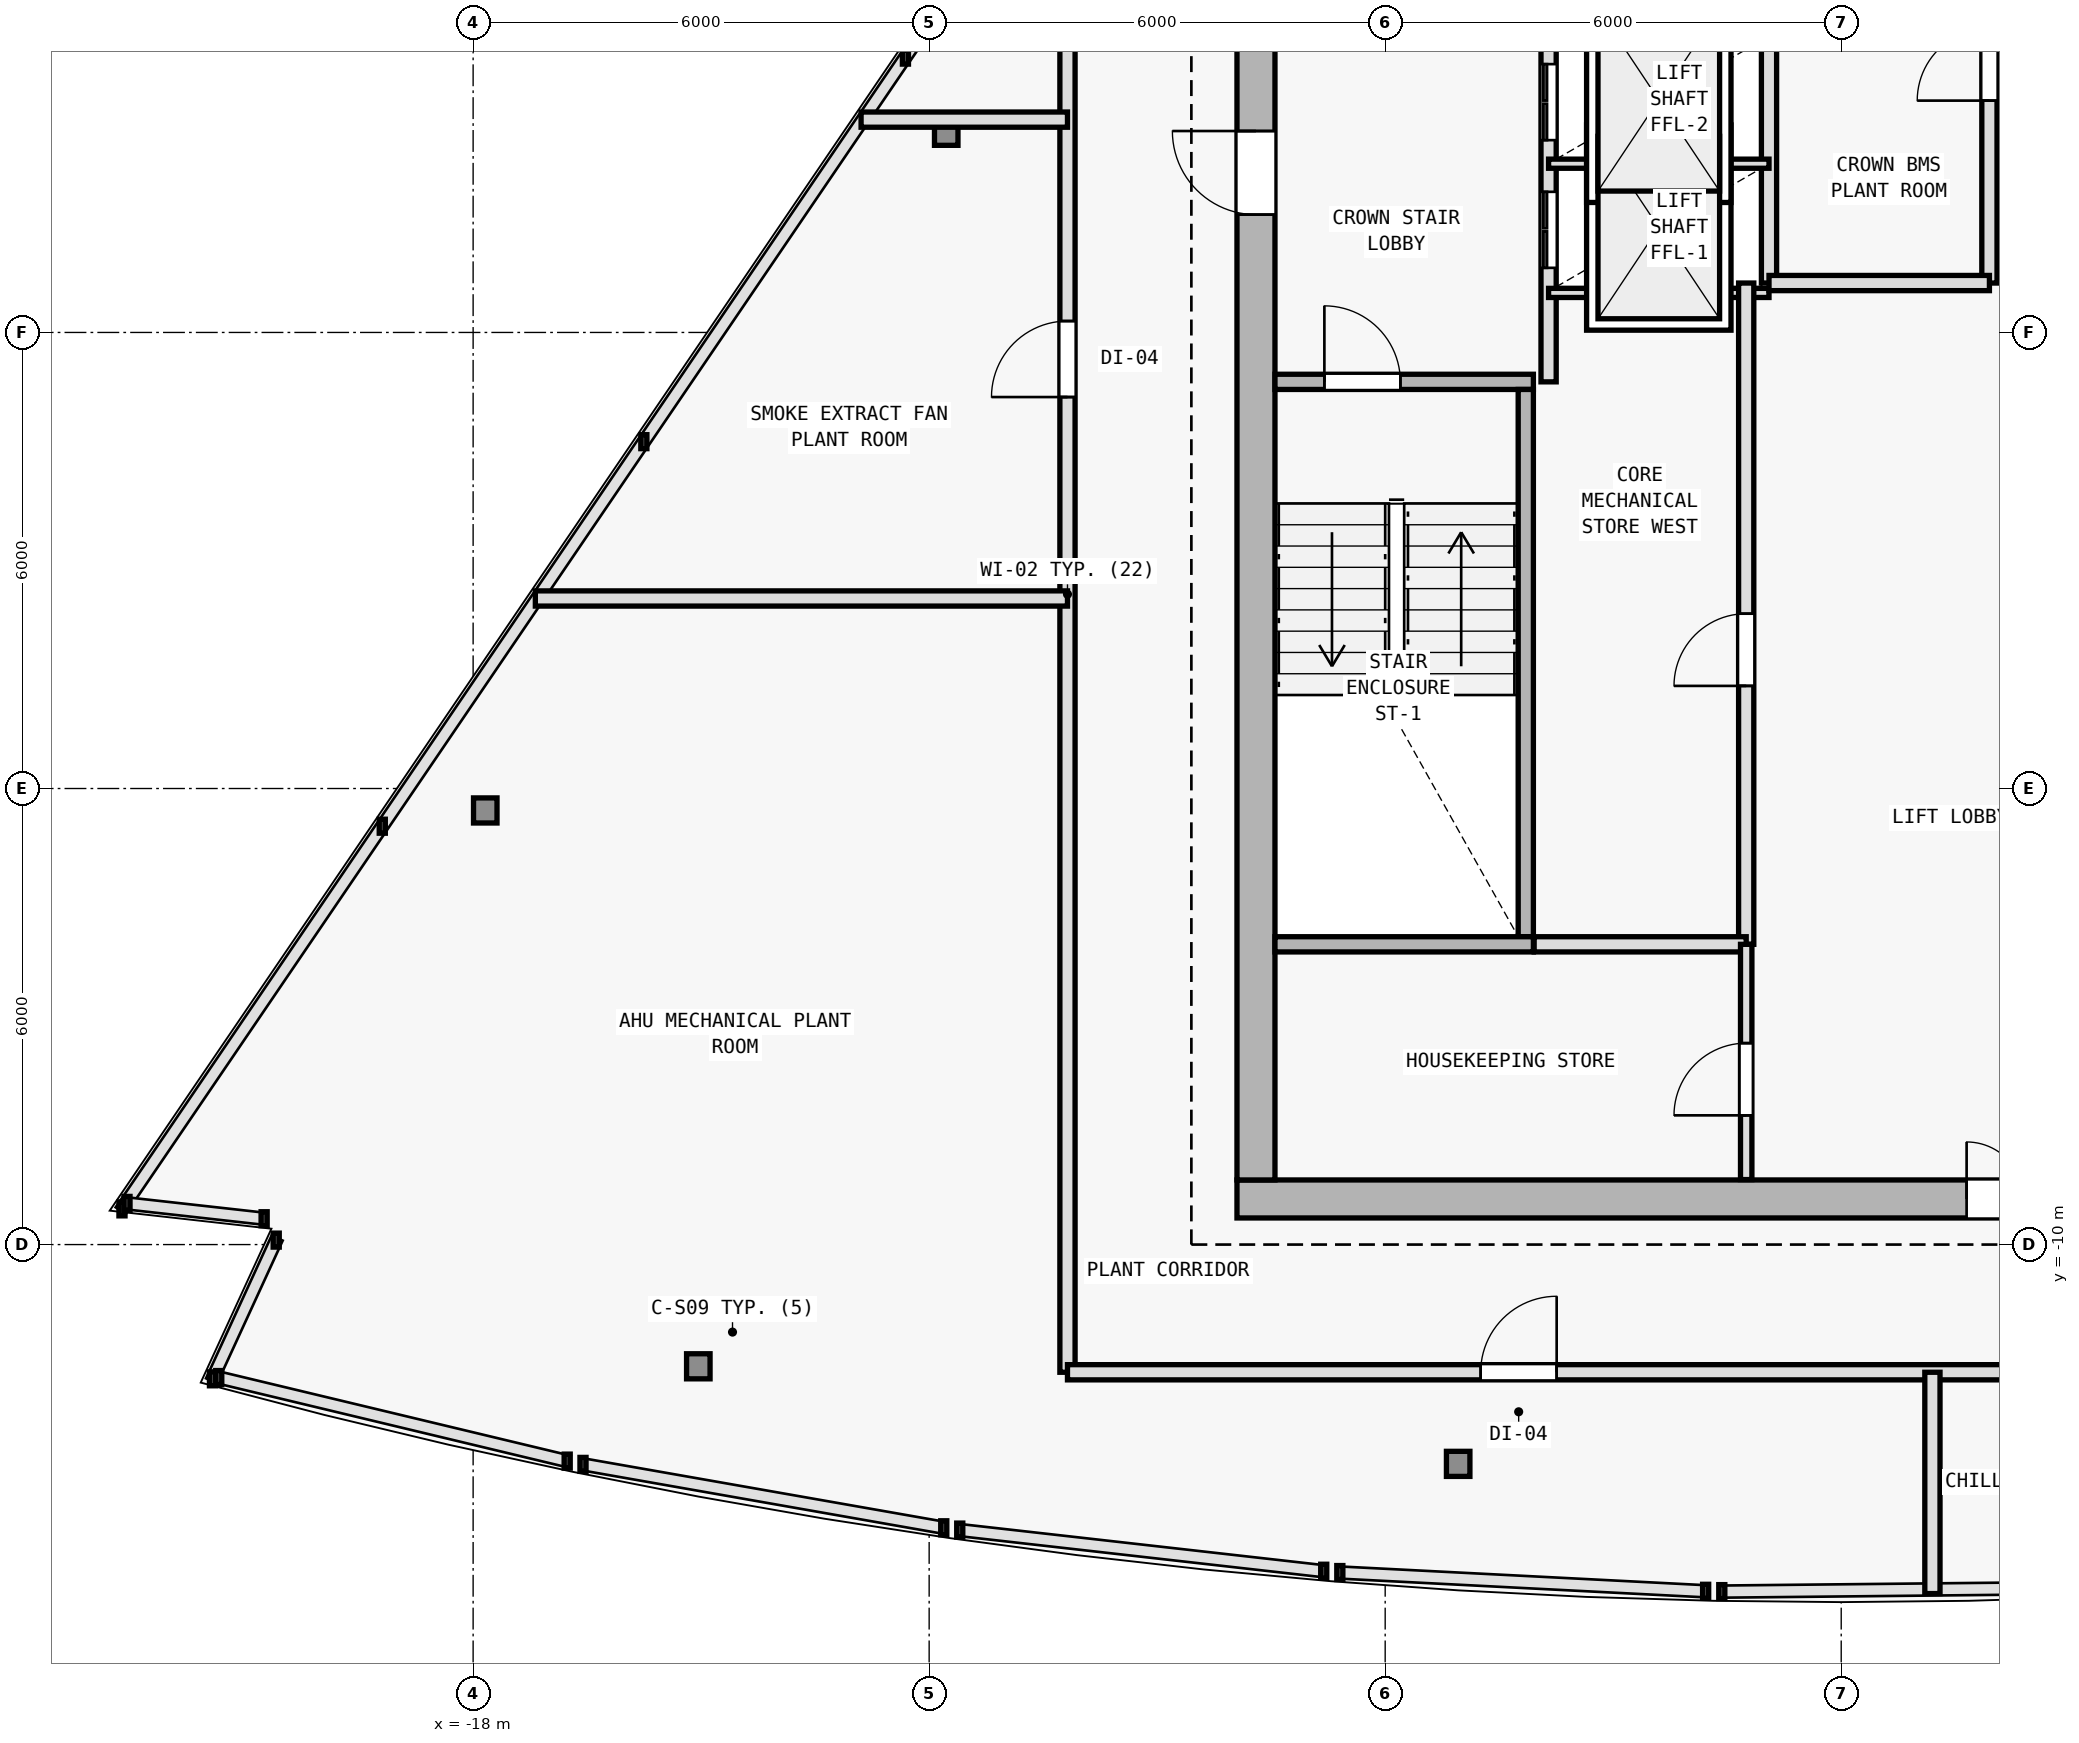
"""IFC4 building model, lengths in metres.
Left out: names, types, materials, properties, quantities, classifications, styles, units other than length and angle.
Written with IfcOpenShell. Run it as: python <this file> out.ifc"""

import sys

from ifc_helpers import new_model, si_unit, direction, frame, frame_2d, origin, origin_2d, place, context, subcontext, project, spatial, rectangle, i_section, extrude, element, fill, save


model = new_model("IFC4")
c1 = context("Model", 3, precision=1e-05, world=origin(), true_north=direction((0.0, 1.0)))
c2 = subcontext(c1, "Body", "Model", "MODEL_VIEW")
j1 = project(units=[si_unit("LENGTHUNIT", "METRE"), si_unit("PLANEANGLEUNIT", "RADIAN")], contexts=[c1])
p1 = place(None, origin())
s1 = spatial("IfcSite", under=j1, at=p1, CompositionType="ELEMENT")
p2 = place(p1, origin())
s2 = spatial("IfcBuilding", under=s1, at=p2, CompositionType="ELEMENT")
p3 = place(p2, frame((0.0, 0.0, 315.6)))
s3 = spatial("IfcBuildingStorey", under=s2, at=p3, CompositionType="ELEMENT", Elevation=315.6)
for number, where, z_axis, x_axis in (
    (1, (-7.7, -9.4, 0.0), (0.0, 0.0, 1.0), (1.0, 0.0, 0.0)),
    (2, (0.0, -9.4, 0.0), (0.0, 0.0, 1.0), (1.0, 0.0, 0.0)),
    (3, (-7.7, 2.0, 0.0), (0.0, 0.0, 1.0), (1.0, 0.0, 0.0)),
):
    element("IfcColumn", number, at=place(p3, frame(where, z_axis=z_axis, x_axis=x_axis)), inside=s3, PredefinedType="COLUMN", context=c2, shape_type="SweptSolid", body=[
        extrude(i_section(OverallWidth=0.374, OverallDepth=0.372, WebThickness=0.012, FlangeThickness=0.02, FilletRadius=0.015, at=origin_2d()), origin(), (0.0, 0.0, 1.0), 3.6),
    ])
for number, where, z_axis, x_axis in (
    (4, (-15.037, -11.602, 0.0), (0.0, 0.0, 1.0), (1.0, 0.0, 0.0)),
    (5, (-5.04, -12.885, 0.0), (0.0, 0.0, 1.0), (1.0, 0.0, 0.0)),
    (6, (-17.84, -4.289, 0.0), (0.0, 0.0, 1.0), (1.0, 0.0, 0.0)),
    (7, (-11.775, 4.627, 0.0), (0.0, 0.0, 1.0), (1.0, 0.0, 0.0)),
):
    element("IfcColumn", number, at=place(p3, frame(where, z_axis=z_axis, x_axis=x_axis)), inside=s3, PredefinedType="COLUMN", context=c2, shape_type="SweptSolid", body=[
        extrude(i_section(OverallWidth=0.309, OverallDepth=0.33, WebThickness=0.011, FlangeThickness=0.019, FilletRadius=0.027, at=origin_2d()), origin(), (0.0, 0.0, 1.0), 3.6),
    ])
p4 = place(p3, frame((-7.95, -9.4, 0.0), z_axis=(0.0, 0.0, 1.0), x_axis=(1.0, 0.0, 0.0)))
e8 = element("IfcWall", 8, at=p4, inside=s3, PredefinedType="SHEAR", context=c2, shape_type="SweptSolid", body=[
    extrude(rectangle(XDim=15.9, YDim=0.5, at=frame_2d((7.95, 0.0))), origin(), (0.0, 0.0, 1.0), 3.34),
])
p5 = place(p4, frame((9.6, 0.0, 0.0)))
e9 = element("IfcOpeningElement", 9, at=p5, cuts=e8, PredefinedType="OPENING", context=c2, shape_type="SweptSolid", body=[
    extrude(rectangle(XDim=1.5, YDim=2.2, at=frame_2d((0.75, 1.1))), frame((0.0, 0.26, 0.0), z_axis=(0.0, -1.0, 0.0), x_axis=(1.0, 0.0, 0.0)), (0.0, 0.0, 1.0), 0.52),
])
p6 = place(p3, frame((-7.7, -9.15, 0.0), z_axis=(0.0, 0.0, 1.0), x_axis=(0.0, 1.0, 0.0)))
e10 = element("IfcWall", 10, at=p6, inside=s3, PredefinedType="SHEAR", context=c2, shape_type="SweptSolid", body=[
    extrude(rectangle(XDim=19.1, YDim=0.5, at=frame_2d((9.55, 0.0))), origin(), (0.0, 0.0, 1.0), 3.34),
])
p7 = place(p6, frame((12.7, 0.0, 0.0)))
e11 = element("IfcOpeningElement", 11, at=p7, cuts=e10, PredefinedType="OPENING", context=c2, shape_type="SweptSolid", body=[
    extrude(rectangle(XDim=1.1, YDim=2.15, at=frame_2d((0.55, 1.075))), frame((0.0, 0.26, 0.0), z_axis=(0.0, -1.0, 0.0), x_axis=(1.0, 0.0, 0.0)), (0.0, 0.0, 1.0), 0.52),
])
p8 = place(p3, frame((-7.45, 1.35, 0.0), z_axis=(0.0, 0.0, 1.0), x_axis=(1.0, 0.0, 0.0)))
e12 = element("IfcWall", 12, at=p8, inside=s3, PredefinedType="SOLIDWALL", context=c2, shape_type="SweptSolid", body=[
    extrude(rectangle(XDim=3.4, YDim=0.2, at=frame_2d((1.7, 0.0))), origin(), (0.0, 0.0, 1.0), 3.34),
])
p9 = place(p8, frame((0.65, 0.0, 0.0)))
e13 = element("IfcOpeningElement", 13, at=p9, cuts=e12, PredefinedType="OPENING", context=c2, shape_type="SweptSolid", body=[
    extrude(rectangle(XDim=1.0, YDim=2.15, at=frame_2d((0.5, 1.075))), frame((0.0, 0.11, 0.0), z_axis=(0.0, -1.0, 0.0), x_axis=(1.0, 0.0, 0.0)), (0.0, 0.0, 1.0), 0.22),
])
p10 = place(p3, frame((-4.15, -5.95, 0.0), z_axis=(0.0, 0.0, 1.0), x_axis=(0.0, 1.0, 0.0)))
e14 = element("IfcWall", 14, at=p10, inside=s3, PredefinedType="SOLIDWALL", context=c2, shape_type="SweptSolid", body=[
    extrude(rectangle(XDim=7.2, YDim=0.2, at=frame_2d((3.6, 0.0))), origin(), (0.0, 0.0, 1.0), 3.34),
])
p11 = place(p3, frame((-3.85, 1.35, 0.0), z_axis=(0.0, 0.0, 1.0), x_axis=(0.0, 1.0, 0.0)))
e15 = element("IfcWall", 15, at=p11, inside=s3, PredefinedType="SOLIDWALL", context=c2, shape_type="SweptSolid", body=[
    extrude(rectangle(XDim=8.595, YDim=0.2, at=frame_2d((4.297, 0.0))), origin(), (0.0, 0.0, 1.0), 3.34),
])
p12 = place(p11, frame((1.5, 0.0, 0.0)))
e16 = element("IfcOpeningElement", 16, at=p12, cuts=e15, PredefinedType="OPENING", context=c2, shape_type="SweptSolid", body=[
    extrude(rectangle(XDim=1.0, YDim=2.15, at=frame_2d((0.5, 1.075))), frame((0.0, 0.11, 0.0), z_axis=(0.0, -1.0, 0.0), x_axis=(1.0, 0.0, 0.0)), (0.0, 0.0, 1.0), 0.22),
])
p13 = place(p11, frame((3.18, 0.0, 0.0)))
e17 = element("IfcOpeningElement", 17, at=p13, cuts=e15, PredefinedType="OPENING", context=c2, shape_type="SweptSolid", body=[
    extrude(rectangle(XDim=1.0, YDim=2.15, at=frame_2d((0.5, 1.075))), frame((0.0, 0.11, 0.0), z_axis=(0.0, -1.0, 0.0), x_axis=(1.0, 0.0, 0.0)), (0.0, 0.0, 1.0), 0.22),
])
p14 = place(p3, frame((-0.95, 2.65, 0.0), z_axis=(0.0, 0.0, 1.0), x_axis=(0.0, 1.0, 0.0)))
e18 = element("IfcWall", 18, at=p14, inside=s3, PredefinedType="SOLIDWALL", context=c2, shape_type="SweptSolid", body=[
    extrude(rectangle(XDim=3.27, YDim=0.2, at=frame_2d((1.635, 0.0))), origin(), (0.0, 0.0, 1.0), 3.34),
])
for number, where, z_axis, x_axis in (
    (19, (-3.85, 2.52, 0.0), (0.0, 0.0, 1.0), (1.0, 0.0, 0.0)),
    (20, (-3.85, 4.22, 0.0), (0.0, 0.0, 1.0), (1.0, 0.0, 0.0)),
):
    element("IfcWall", number, at=place(p3, frame(where, z_axis=z_axis, x_axis=x_axis)), inside=s3, PredefinedType="PARTITIONING", context=c2, shape_type="SweptSolid", body=[
        extrude(rectangle(XDim=2.9, YDim=0.12, at=frame_2d((1.45, 0.0))), origin(), (0.0, 0.0, 1.0), 3.34),
    ])
p15 = place(p3, frame((-1.25, -6.05, 0.0), z_axis=(0.0, 0.0, 1.0), x_axis=(0.0, 1.0, 0.0)))
e21 = element("IfcWall", 21, at=p15, inside=s3, PredefinedType="SOLIDWALL", context=c2, shape_type="SweptSolid", body=[
    extrude(rectangle(XDim=8.7, YDim=0.2, at=frame_2d((4.35, 0.0))), origin(), (0.0, 0.0, 1.0), 3.34),
])
p16 = place(p15, frame((3.4, 0.0, 0.0)))
e22 = element("IfcOpeningElement", 22, at=p16, cuts=e21, PredefinedType="OPENING", context=c2, shape_type="SweptSolid", body=[
    extrude(rectangle(XDim=0.95, YDim=2.1, at=frame_2d((0.475, 1.05))), frame((0.0, 0.11, 0.0), z_axis=(0.0, -1.0, 0.0), x_axis=(1.0, 0.0, 0.0)), (0.0, 0.0, 1.0), 0.22),
])
p17 = place(p3, frame((1.95, 2.65, 0.0), z_axis=(0.0, 0.0, 1.0), x_axis=(0.0, 1.0, 0.0)))
e23 = element("IfcWall", 23, at=p17, inside=s3, PredefinedType="SOLIDWALL", context=c2, shape_type="SweptSolid", body=[
    extrude(rectangle(XDim=7.295, YDim=0.2, at=frame_2d((3.647, 0.0))), origin(), (0.0, 0.0, 1.0), 3.34),
])
p18 = place(p17, frame((2.4, 0.0, 0.0)))
e24 = element("IfcOpeningElement", 24, at=p18, cuts=e23, PredefinedType="OPENING", context=c2, shape_type="SweptSolid", body=[
    extrude(rectangle(XDim=0.95, YDim=2.1, at=frame_2d((0.475, 1.05))), frame((0.0, 0.11, 0.0), z_axis=(0.0, -1.0, 0.0), x_axis=(1.0, 0.0, 0.0)), (0.0, 0.0, 1.0), 0.22),
])
p19 = place(p3, frame((-0.95, 2.65, 0.0), z_axis=(0.0, 0.0, 1.0), x_axis=(1.0, 0.0, 0.0)))
e25 = element("IfcWall", 25, at=p19, inside=s3, PredefinedType="SOLIDWALL", context=c2, shape_type="SweptSolid", body=[
    extrude(rectangle(XDim=2.9, YDim=0.2, at=frame_2d((1.45, 0.0))), origin(), (0.0, 0.0, 1.0), 3.34),
])
p20 = place(p3, frame((-7.45, -6.05, 0.0), z_axis=(0.0, 0.0, 1.0), x_axis=(1.0, 0.0, 0.0)))
e26 = element("IfcWall", 26, at=p20, inside=s3, PredefinedType="SOLIDWALL", context=c2, shape_type="SweptSolid", body=[
    extrude(rectangle(XDim=3.4, YDim=0.2, at=frame_2d((1.7, 0.0))), origin(), (0.0, 0.0, 1.0), 3.34),
])
p21 = place(p3, frame((-4.04, -6.05, 0.0), z_axis=(0.0, 0.0, 1.0), x_axis=(1.0, 0.0, 0.0)))
e27 = element("IfcWall", 27, at=p21, inside=s3, PredefinedType="SOLIDWALL", context=c2, shape_type="SweptSolid", body=[
    extrude(rectangle(XDim=2.79, YDim=0.2, at=frame_2d((1.395, 0.0))), origin(), (0.0, 0.0, 1.0), 3.34),
])
p22 = place(p3, frame((-1.25, -9.145, 0.0), z_axis=(0.0, 0.0, 1.0), x_axis=(0.0, 1.0, 0.0)))
e28 = element("IfcWall", 28, at=p22, inside=s3, PredefinedType="PARTITIONING", context=c2, shape_type="SweptSolid", body=[
    extrude(rectangle(XDim=3.095, YDim=0.15, at=frame_2d((1.547, 0.0))), origin(), (0.0, 0.0, 1.0), 3.34),
])
p23 = place(p22, frame((0.845, 0.0, 0.0)))
e29 = element("IfcOpeningElement", 29, at=p23, cuts=e28, PredefinedType="OPENING", context=c2, shape_type="SweptSolid", body=[
    extrude(rectangle(XDim=0.95, YDim=2.1, at=frame_2d((0.475, 1.05))), frame((0.0, 0.085, 0.0), z_axis=(0.0, -1.0, 0.0), x_axis=(1.0, 0.0, 0.0)), (0.0, 0.0, 1.0), 0.17),
])
p24 = place(p3, frame((-10.18, -11.68, 0.0), z_axis=(0.0, 0.0, 1.0), x_axis=(0.0, 1.0, 0.0)))
e30 = element("IfcWall", 30, at=p24, inside=s3, PredefinedType="SOLIDWALL", context=c2, shape_type="SweptSolid", body=[
    extrude(rectangle(XDim=20.472, YDim=0.2, at=frame_2d((10.236, 0.0))), origin(), (0.0, 0.0, 1.0), 2.995),
])
p25 = place(p24, frame((12.83, 0.0, 0.0)))
e31 = element("IfcOpeningElement", 31, at=p25, cuts=e30, PredefinedType="OPENING", context=c2, shape_type="SweptSolid", body=[
    extrude(rectangle(XDim=1.0, YDim=2.15, at=frame_2d((0.5, 1.075))), frame((0.0, 0.11, 0.0), z_axis=(0.0, -1.0, 0.0), x_axis=(1.0, 0.0, 0.0)), (0.0, 0.0, 1.0), 0.22),
])
p26 = place(p3, frame((-10.18, -11.68, 0.0), z_axis=(0.0, 0.0, 1.0), x_axis=(1.0, 0.0, 0.0)))
e32 = element("IfcWall", 32, at=p26, inside=s3, PredefinedType="SOLIDWALL", context=c2, shape_type="SweptSolid", body=[
    extrude(rectangle(XDim=18.13, YDim=0.2, at=frame_2d((9.065, 0.0))), origin(), (0.0, 0.0, 1.0), 2.995),
])
p27 = place(p26, frame((5.436, 0.0, 0.0)))
e33 = element("IfcOpeningElement", 33, at=p27, cuts=e32, PredefinedType="OPENING", context=c2, shape_type="SweptSolid", body=[
    extrude(rectangle(XDim=1.0, YDim=2.15, at=frame_2d((0.5, 1.075))), frame((0.0, 0.11, 0.0), z_axis=(0.0, -1.0, 0.0), x_axis=(1.0, 0.0, 0.0)), (0.0, 0.0, 1.0), 0.22),
])
p28 = place(p26, frame((14.189, 0.0, 0.0)))
e34 = element("IfcOpeningElement", 34, at=p28, cuts=e32, PredefinedType="OPENING", context=c2, shape_type="SweptSolid", body=[
    extrude(rectangle(XDim=1.0, YDim=2.15, at=frame_2d((0.5, 1.075))), frame((0.0, 0.11, 0.0), z_axis=(0.0, -1.0, 0.0), x_axis=(1.0, 0.0, 0.0)), (0.0, 0.0, 1.0), 0.22),
])
p29 = place(p3, frame((-17.181, -1.5, 0.0), z_axis=(0.0, 0.0, 1.0), x_axis=(1.0, 0.0, 0.0)))
e35 = element("IfcWall", 35, at=p29, inside=s3, PredefinedType="SOLIDWALL", context=c2, shape_type="SweptSolid", body=[
    extrude(rectangle(XDim=7.001, YDim=0.2, at=frame_2d((3.501, 0.0))), origin(), (0.0, 0.0, 1.0), 3.34),
])
p30 = place(p3, frame((-12.896, 4.8, 0.0), z_axis=(0.0, 0.0, 1.0), x_axis=(1.0, 0.0, 0.0)))
e36 = element("IfcWall", 36, at=p30, inside=s3, PredefinedType="SOLIDWALL", context=c2, shape_type="SweptSolid", body=[
    extrude(rectangle(XDim=2.716, YDim=0.2, at=frame_2d((1.358, 0.0))), origin(), (0.0, 0.0, 1.0), 2.995),
])
p31 = place(p3, frame((1.2, -14.592, 0.0), z_axis=(0.0, 0.0, 1.0), x_axis=(0.0, 1.0, 0.0)))
e37 = element("IfcWall", 37, at=p31, inside=s3, PredefinedType="SOLIDWALL", context=c2, shape_type="SweptSolid", body=[
    extrude(rectangle(XDim=2.912, YDim=0.2, at=frame_2d((1.456, 0.0))), origin(), (0.0, 0.0, 1.0), 3.34),
])
p32 = place(p5, origin())
e38 = element("IfcDoor", 38, at=p32, inside=s3, OperationType="DOUBLE_DOOR_SINGLE_SWING", PredefinedType="DOOR", context=c2, shape_type="SweptSolid", body=[
    extrude(rectangle(XDim=1.5, YDim=2.2, at=frame_2d((0.75, 1.1))), frame((0.0, 0.025, 0.0), z_axis=(0.0, -1.0, 0.0), x_axis=(1.0, 0.0, 0.0)), (0.0, 0.0, 1.0), 0.05),
])
fill(e9, e38)
p33 = place(p7, origin())
e39 = element("IfcDoor", 39, at=p33, inside=s3, OperationType="SINGLE_SWING_RIGHT", PredefinedType="DOOR", context=c2, shape_type="SweptSolid", body=[
    extrude(rectangle(XDim=1.1, YDim=2.15, at=frame_2d((0.55, 1.075))), frame((0.0, 0.025, 0.0), z_axis=(0.0, -1.0, 0.0), x_axis=(1.0, 0.0, 0.0)), (0.0, 0.0, 1.0), 0.05),
])
fill(e11, e39)
p34 = place(p9, origin())
e40 = element("IfcDoor", 40, at=p34, inside=s3, OperationType="SINGLE_SWING_LEFT", PredefinedType="DOOR", context=c2, shape_type="SweptSolid", body=[
    extrude(rectangle(XDim=1.0, YDim=2.15, at=frame_2d((0.5, 1.075))), frame((0.0, 0.025, 0.0), z_axis=(0.0, -1.0, 0.0), x_axis=(1.0, 0.0, 0.0)), (0.0, 0.0, 1.0), 0.05),
])
fill(e13, e40)
p35 = place(p16, origin())
e41 = element("IfcDoor", 41, at=p35, inside=s3, OperationType="SINGLE_SWING_LEFT", PredefinedType="DOOR", context=c2, shape_type="SweptSolid", body=[
    extrude(rectangle(XDim=0.95, YDim=2.1, at=frame_2d((0.475, 1.05))), frame((0.0, 0.025, 0.0), z_axis=(0.0, -1.0, 0.0), x_axis=(1.0, 0.0, 0.0)), (0.0, 0.0, 1.0), 0.05),
])
fill(e22, e41)
p36 = place(p18, origin())
e42 = element("IfcDoor", 42, at=p36, inside=s3, OperationType="SINGLE_SWING_LEFT", PredefinedType="DOOR", context=c2, shape_type="SweptSolid", body=[
    extrude(rectangle(XDim=0.95, YDim=2.1, at=frame_2d((0.475, 1.05))), frame((0.0, 0.025, 0.0), z_axis=(0.0, -1.0, 0.0), x_axis=(1.0, 0.0, 0.0)), (0.0, 0.0, 1.0), 0.05),
])
fill(e24, e42)
p37 = place(p12, origin())
e43 = element("IfcDoor", 43, at=p37, inside=s3, OperationType="DOUBLE_DOOR_SLIDING", PredefinedType="DOOR", context=c2, shape_type="SweptSolid", body=[
    extrude(rectangle(XDim=1.0, YDim=2.15, at=frame_2d((0.5, 1.075))), frame((0.0, 0.025, 0.0), z_axis=(0.0, -1.0, 0.0), x_axis=(1.0, 0.0, 0.0)), (0.0, 0.0, 1.0), 0.05),
])
fill(e16, e43)
p38 = place(p13, origin())
e44 = element("IfcDoor", 44, at=p38, inside=s3, OperationType="DOUBLE_DOOR_SLIDING", PredefinedType="DOOR", context=c2, shape_type="SweptSolid", body=[
    extrude(rectangle(XDim=1.0, YDim=2.15, at=frame_2d((0.5, 1.075))), frame((0.0, 0.025, 0.0), z_axis=(0.0, -1.0, 0.0), x_axis=(1.0, 0.0, 0.0)), (0.0, 0.0, 1.0), 0.05),
])
fill(e17, e44)
p39 = place(p23, origin())
e45 = element("IfcDoor", 45, at=p39, inside=s3, OperationType="SINGLE_SWING_LEFT", PredefinedType="DOOR", context=c2, shape_type="SweptSolid", body=[
    extrude(rectangle(XDim=0.95, YDim=2.1, at=frame_2d((0.475, 1.05))), frame((0.0, 0.025, 0.0), z_axis=(0.0, -1.0, 0.0), x_axis=(1.0, 0.0, 0.0)), (0.0, 0.0, 1.0), 0.05),
])
fill(e29, e45)
p40 = place(p27, origin())
e46 = element("IfcDoor", 46, at=p40, inside=s3, OperationType="SINGLE_SWING_RIGHT", PredefinedType="DOOR", context=c2, shape_type="SweptSolid", body=[
    extrude(rectangle(XDim=1.0, YDim=2.15, at=frame_2d((0.5, 1.075))), frame((0.0, 0.025, 0.0), z_axis=(0.0, -1.0, 0.0), x_axis=(1.0, 0.0, 0.0)), (0.0, 0.0, 1.0), 0.05),
])
fill(e33, e46)
p41 = place(p25, origin())
e47 = element("IfcDoor", 47, at=p41, inside=s3, OperationType="SINGLE_SWING_LEFT", PredefinedType="DOOR", context=c2, shape_type="SweptSolid", body=[
    extrude(rectangle(XDim=1.0, YDim=2.15, at=frame_2d((0.5, 1.075))), frame((0.0, 0.025, 0.0), z_axis=(0.0, -1.0, 0.0), x_axis=(1.0, 0.0, 0.0)), (0.0, 0.0, 1.0), 0.05),
])
fill(e31, e47)
save(model, sys.argv[1])
